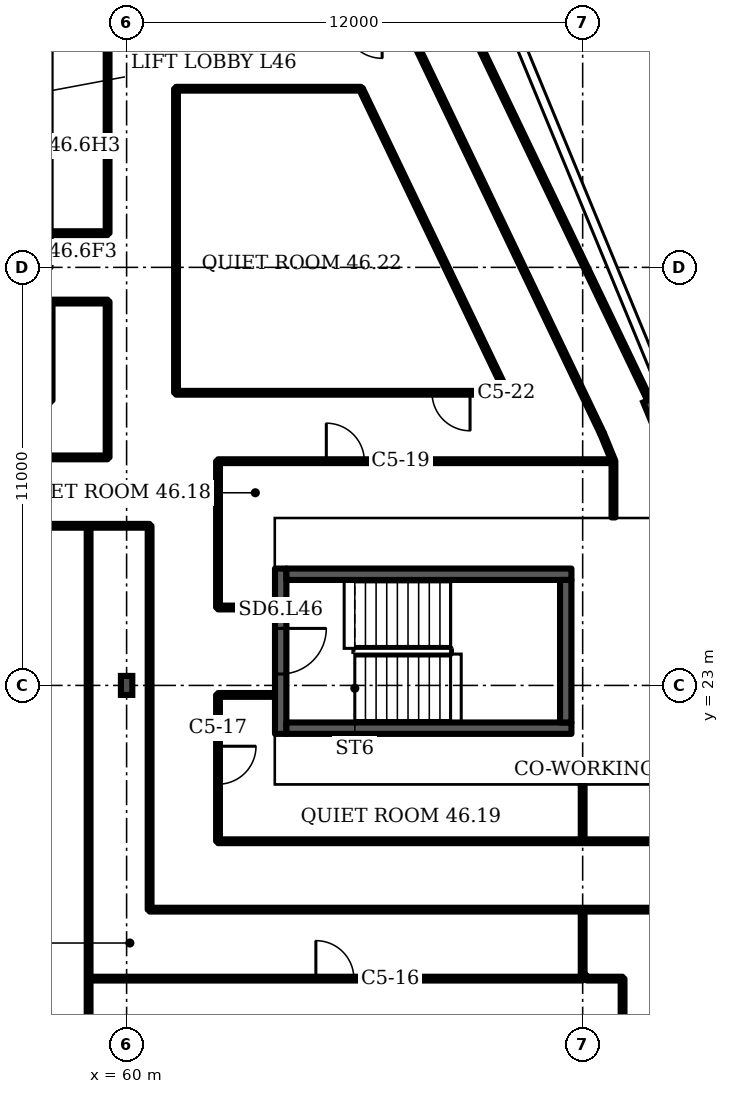
"""IFC4 building model, lengths in metres.
Left out: names, types, materials, properties, quantities, classifications, styles, units other than length and angle.
Written with IfcOpenShell. Run it as: python <this file> out.ifc"""

import sys

from ifc_helpers import new_model, si_unit, direction, frame, frame_2d, origin, origin_2d, place, context, subcontext, project, spatial, rectangle, i_section, extrude, element, fill, save


model = new_model("IFC4")
c1 = context("Model", 3, precision=1e-05, world=origin(), true_north=direction((0.0, 1.0)))
c2 = subcontext(c1, "Body", "Model", "MODEL_VIEW")
j1 = project(units=[si_unit("LENGTHUNIT", "METRE"), si_unit("PLANEANGLEUNIT", "RADIAN")], contexts=[c1])
p1 = place(None, origin())
s1 = spatial("IfcSite", under=j1, at=p1, CompositionType="ELEMENT")
p2 = place(p1, origin())
s2 = spatial("IfcBuilding", under=s1, at=p2, CompositionType="ELEMENT")
p3 = place(p2, frame((0.0, 0.0, 187.9)))
s3 = spatial("IfcBuildingStorey", under=s2, at=p3, CompositionType="ELEMENT", Elevation=187.9)
p4 = place(p3, frame((73.854, 30.219, 0.0), z_axis=(0.0, 0.0, 1.0), x_axis=(0.924325, 0.381602, 0.0)))
e1 = element("IfcColumn", 1, at=p4, inside=s3, PredefinedType="COLUMN", context=c2, shape_type="SweptSolid", body=[
    extrude(i_section(OverallWidth=0.305, OverallDepth=0.62, WebThickness=0.021, FlangeThickness=0.04, FilletRadius=0.027, at=origin_2d()), origin(), (0.0, 0.0, 1.0), 3.6),
])
p5 = place(p3, frame((60.0, 23.0, 0.0), z_axis=(0.0, 0.0, 1.0), x_axis=(1.0, 0.0, 0.0)))
e2 = element("IfcColumn", 2, at=p5, inside=s3, PredefinedType="COLUMN", context=c2, shape_type="SweptSolid", body=[
    extrude(i_section(OverallWidth=0.3, OverallDepth=0.5, WebThickness=0.014, FlangeThickness=0.028, FilletRadius=0.027, at=origin_2d()), origin(), (0.0, 0.0, 1.0), 3.6),
])
p6 = place(p3, frame((64.055, 21.725, 0.0), z_axis=(0.0, 0.0, 1.0), x_axis=(0.0, 1.0, 0.0)))
e3 = element("IfcWall", 3, at=p6, inside=s3, PredefinedType="SHEAR", context=c2, shape_type="SweptSolid", body=[
    extrude(rectangle(XDim=4.35, YDim=0.3, at=frame_2d((2.175, 0.0))), origin(), (0.0, 0.0, 1.0), 3.2),
])
p7 = place(p6, frame((1.575, 0.0, 0.0)))
e4 = element("IfcOpeningElement", 4, at=p7, cuts=e3, PredefinedType="OPENING", context=c2, shape_type="SweptSolid", body=[
    extrude(rectangle(XDim=1.2, YDim=2.1, at=frame_2d((0.6, 1.05))), frame((0.0, 0.16, 0.0), z_axis=(0.0, -1.0, 0.0), x_axis=(1.0, 0.0, 0.0)), (0.0, 0.0, 1.0), 0.32),
])
p8 = place(p3, frame((18.635, 29.0, 0.0), z_axis=(0.0, 0.0, 1.0), x_axis=(1.0, 0.0, 0.0)))
e5 = element("IfcWall", 5, at=p8, inside=s3, PredefinedType="PARTITIONING", context=c2, shape_type="SweptSolid", body=[
    extrude(rectangle(XDim=40.865, YDim=0.1, at=frame_2d((20.433, 0.0))), origin(), (0.0, 0.0, 1.0), 3.2),
])
p9 = place(p8, frame((30.545, 0.0, 0.0)))
e6 = element("IfcOpeningElement", 6, at=p9, cuts=e5, PredefinedType="OPENING", context=c2, shape_type="SweptSolid", body=[
    extrude(rectangle(XDim=1.0, YDim=2.1, at=frame_2d((0.5, 1.05))), frame((0.0, 0.06, 0.0), z_axis=(0.0, -1.0, 0.0), x_axis=(1.0, 0.0, 0.0)), (0.0, 0.0, 1.0), 0.12),
])
p10 = place(p3, frame((19.3, 27.2, 0.0), z_axis=(0.0, 0.0, 1.0), x_axis=(1.0, 0.0, 0.0)))
e7 = element("IfcWall", 7, at=p10, inside=s3, PredefinedType="PARTITIONING", context=c2, shape_type="SweptSolid", body=[
    extrude(rectangle(XDim=41.305, YDim=0.1, at=frame_2d((20.652, 0.0))), origin(), (0.0, 0.0, 1.0), 3.2),
])
p11 = place(p10, frame((32.32, 0.0, 0.0)))
e8 = element("IfcOpeningElement", 8, at=p11, cuts=e7, PredefinedType="OPENING", context=c2, shape_type="SweptSolid", body=[
    extrude(rectangle(XDim=1.8, YDim=2.1, at=frame_2d((0.9, 1.05))), frame((0.0, 0.06, 0.0), z_axis=(0.0, -1.0, 0.0), x_axis=(1.0, 0.0, 0.0)), (0.0, 0.0, 1.0), 0.12),
])
p12 = place(p3, frame((58.0, 33.1, 0.0), z_axis=(0.0, 0.0, 1.0), x_axis=(1.0, 0.0, 0.0)))
e9 = element("IfcWall", 9, at=p12, inside=s3, PredefinedType="PARTITIONING", context=c2, shape_type="SweptSolid", body=[
    extrude(rectangle(XDim=1.5, YDim=0.1, at=frame_2d((0.75, 0.0))), origin(), (0.0, 0.0, 1.0), 3.2),
])
p13 = place(p3, frame((58.02, 34.9, 0.0), z_axis=(0.0, 0.0, 1.0), x_axis=(1.0, 0.0, 0.0)))
e10 = element("IfcWall", 10, at=p13, inside=s3, PredefinedType="PARTITIONING", context=c2, shape_type="SweptSolid", body=[
    extrude(rectangle(XDim=1.48, YDim=0.1, at=frame_2d((0.74, 0.0))), origin(), (0.0, 0.0, 1.0), 3.2),
])
p14 = place(p3, frame((59.0, 13.625, 0.0), z_axis=(0.0, 0.0, 1.0), x_axis=(0.0, 1.0, 0.0)))
e11 = element("IfcWall", 11, at=p14, inside=s3, PredefinedType="PARTITIONING", context=c2, shape_type="SweptSolid", body=[
    extrude(rectangle(XDim=13.575, YDim=0.1, at=frame_2d((6.788, 0.0))), origin(), (0.0, 0.0, 1.0), 3.2),
])
p15 = place(p3, frame((59.0, 15.285, 0.0), z_axis=(0.0, 0.0, 1.0), x_axis=(1.0, 0.0, 0.0)))
e12 = element("IfcWall", 12, at=p15, inside=s3, PredefinedType="PARTITIONING", context=c2, shape_type="SweptSolid", body=[
    extrude(rectangle(XDim=13.0, YDim=0.1, at=frame_2d((6.5, 0.0))), origin(), (0.0, 0.0, 1.0), 3.2),
])
p16 = place(p15, frame((5.98, 0.0, 0.0)))
e13 = element("IfcOpeningElement", 13, at=p16, cuts=e12, PredefinedType="OPENING", context=c2, shape_type="SweptSolid", body=[
    extrude(rectangle(XDim=1.0, YDim=2.1, at=frame_2d((0.5, 1.05))), frame((0.0, 0.06, 0.0), z_axis=(0.0, -1.0, 0.0), x_axis=(1.0, 0.0, 0.0)), (0.0, 0.0, 1.0), 0.12),
])
p17 = place(p3, frame((59.5, 29.0, 0.0), z_axis=(0.0, 0.0, 1.0), x_axis=(0.0, 1.0, 0.0)))
e14 = element("IfcWall", 14, at=p17, inside=s3, PredefinedType="PARTITIONING", context=c2, shape_type="SweptSolid", body=[
    extrude(rectangle(XDim=4.1, YDim=0.1, at=frame_2d((2.05, 0.0))), origin(), (0.0, 0.0, 1.0), 3.2),
])
p18 = place(p3, frame((59.5, 34.9, 0.0), z_axis=(0.0, 0.0, 1.0), x_axis=(0.0, 1.0, 0.0)))
e15 = element("IfcWall", 15, at=p18, inside=s3, PredefinedType="PARTITIONING", context=c2, shape_type="SweptSolid", body=[
    extrude(rectangle(XDim=5.6, YDim=0.1, at=frame_2d((2.8, 0.0))), origin(), (0.0, 0.0, 1.0), 3.2),
])
p19 = place(p3, frame((60.605, 17.1, 0.0), z_axis=(0.0, 0.0, 1.0), x_axis=(0.0, 1.0, 0.0)))
e16 = element("IfcWall", 16, at=p19, inside=s3, PredefinedType="PARTITIONING", context=c2, shape_type="SweptSolid", body=[
    extrude(rectangle(XDim=10.1, YDim=0.1, at=frame_2d((5.05, 0.0))), origin(), (0.0, 0.0, 1.0), 3.2),
])
p20 = place(p3, frame((60.605, 17.1, 0.0), z_axis=(0.0, 0.0, 1.0), x_axis=(1.0, 0.0, 0.0)))
e17 = element("IfcWall", 17, at=p20, inside=s3, PredefinedType="PARTITIONING", context=c2, shape_type="SweptSolid", body=[
    extrude(rectangle(XDim=15.58, YDim=0.1, at=frame_2d((7.79, 0.0))), origin(), (0.0, 0.0, 1.0), 3.2),
])
p21 = place(p3, frame((61.3, 30.7, 0.0), z_axis=(0.0, 0.0, 1.0), x_axis=(0.0, 1.0, 0.0)))
e18 = element("IfcWall", 18, at=p21, inside=s3, PredefinedType="PARTITIONING", context=c2, shape_type="SweptSolid", body=[
    extrude(rectangle(XDim=8.0, YDim=0.1, at=frame_2d((4.0, 0.0))), origin(), (0.0, 0.0, 1.0), 3.2),
])
p22 = place(p3, frame((61.3, 30.7, 0.0), z_axis=(0.0, 0.0, 1.0), x_axis=(1.0, 0.0, 0.0)))
e19 = element("IfcWall", 19, at=p22, inside=s3, PredefinedType="PARTITIONING", context=c2, shape_type="SweptSolid", body=[
    extrude(rectangle(XDim=8.7, YDim=0.1, at=frame_2d((4.35, 0.0))), origin(), (0.0, 0.0, 1.0), 3.2),
])
p23 = place(p22, frame((6.737, 0.0, 0.0)))
e20 = element("IfcOpeningElement", 20, at=p23, cuts=e19, PredefinedType="OPENING", context=c2, shape_type="SweptSolid", body=[
    extrude(rectangle(XDim=1.0, YDim=2.1, at=frame_2d((0.5, 1.05))), frame((0.0, 0.06, 0.0), z_axis=(0.0, -1.0, 0.0), x_axis=(1.0, 0.0, 0.0)), (0.0, 0.0, 1.0), 0.12),
])
p24 = place(p3, frame((61.3, 38.7, 0.0), z_axis=(0.0, 0.0, 1.0), x_axis=(1.0, 0.0, 0.0)))
e21 = element("IfcWall", 21, at=p24, inside=s3, PredefinedType="PARTITIONING", context=c2, shape_type="SweptSolid", body=[
    extrude(rectangle(XDim=4.865, YDim=0.1, at=frame_2d((2.433, 0.0))), origin(), (0.0, 0.0, 1.0), 3.2),
])
p25 = place(p3, frame((62.405, 18.9, 0.0), z_axis=(0.0, 0.0, 1.0), x_axis=(0.0, 1.0, 0.0)))
e22 = element("IfcWall", 22, at=p25, inside=s3, PredefinedType="PARTITIONING", context=c2, shape_type="SweptSolid", body=[
    extrude(rectangle(XDim=3.85, YDim=0.1, at=frame_2d((1.925, 0.0))), origin(), (0.0, 0.0, 1.0), 3.2),
])
p26 = place(p25, frame((1.5, 0.0, 0.0)))
e23 = element("IfcOpeningElement", 23, at=p26, cuts=e22, PredefinedType="OPENING", context=c2, shape_type="SweptSolid", body=[
    extrude(rectangle(XDim=1.0, YDim=2.1, at=frame_2d((0.5, 1.05))), frame((0.0, 0.06, 0.0), z_axis=(0.0, -1.0, 0.0), x_axis=(1.0, 0.0, 0.0)), (0.0, 0.0, 1.0), 0.12),
])
p27 = place(p3, frame((62.405, 18.9, 0.0), z_axis=(0.0, 0.0, 1.0), x_axis=(1.0, 0.0, 0.0)))
e24 = element("IfcWall", 24, at=p27, inside=s3, PredefinedType="PARTITIONING", context=c2, shape_type="SweptSolid", body=[
    extrude(rectangle(XDim=14.985, YDim=0.1, at=frame_2d((7.492, 0.0))), origin(), (0.0, 0.0, 1.0), 3.2),
])
p28 = place(p3, frame((62.405, 22.75, 0.0), z_axis=(0.0, 0.0, 1.0), x_axis=(1.0, 0.0, 0.0)))
e25 = element("IfcWall", 25, at=p28, inside=s3, PredefinedType="PARTITIONING", context=c2, shape_type="SweptSolid", body=[
    extrude(rectangle(XDim=1.479, YDim=0.1, at=frame_2d((0.74, 0.0))), origin(), (0.0, 0.0, 1.0), 3.2),
])
p29 = place(p3, frame((62.405, 25.05, 0.0), z_axis=(0.0, 0.0, 1.0), x_axis=(0.0, 1.0, 0.0)))
e26 = element("IfcWall", 26, at=p29, inside=s3, PredefinedType="PARTITIONING", context=c2, shape_type="SweptSolid", body=[
    extrude(rectangle(XDim=3.85, YDim=0.1, at=frame_2d((1.925, 0.0))), origin(), (0.0, 0.0, 1.0), 3.2),
])
p30 = place(p3, frame((62.405, 25.05, 0.0), z_axis=(0.0, 0.0, 1.0), x_axis=(1.0, 0.0, 0.0)))
e27 = element("IfcWall", 27, at=p30, inside=s3, PredefinedType="PARTITIONING", context=c2, shape_type="SweptSolid", body=[
    extrude(rectangle(XDim=1.479, YDim=0.1, at=frame_2d((0.74, 0.0))), origin(), (0.0, 0.0, 1.0), 3.2),
])
p31 = place(p3, frame((62.405, 28.9, 0.0), z_axis=(0.0, 0.0, 1.0), x_axis=(1.0, 0.0, 0.0)))
e28 = element("IfcWall", 28, at=p31, inside=s3, PredefinedType="PARTITIONING", context=c2, shape_type="SweptSolid", body=[
    extrude(rectangle(XDim=10.405, YDim=0.1, at=frame_2d((5.203, 0.0))), origin(), (0.0, 0.0, 1.0), 3.2),
])
p32 = place(p31, frame((2.85, 0.0, 0.0)))
e29 = element("IfcOpeningElement", 29, at=p32, cuts=e28, PredefinedType="OPENING", context=c2, shape_type="SweptSolid", body=[
    extrude(rectangle(XDim=1.0, YDim=2.1, at=frame_2d((0.5, 1.05))), frame((0.0, 0.06, 0.0), z_axis=(0.0, -1.0, 0.0), x_axis=(1.0, 0.0, 0.0)), (0.0, 0.0, 1.0), 0.12),
])
p33 = place(p3, frame((70.0, 30.7, 0.0), z_axis=(0.0, 0.0, 1.0), x_axis=(-0.432271, 0.901748, 0.0)))
e30 = element("IfcWall", 30, at=p33, inside=s3, PredefinedType="PARTITIONING", context=c2, shape_type="SweptSolid", body=[
    extrude(rectangle(XDim=8.872, YDim=0.1, at=frame_2d((4.436, 0.0))), origin(), (0.0, 0.0, 1.0), 3.2),
])
p34 = place(p3, frame((72.0, 15.285, 0.0), z_axis=(0.0, 0.0, 1.0), x_axis=(0.0, 1.0, 0.0)))
e31 = element("IfcWall", 31, at=p34, inside=s3, PredefinedType="PARTITIONING", context=c2, shape_type="SweptSolid", body=[
    extrude(rectangle(XDim=1.815, YDim=0.1, at=frame_2d((0.908, 0.0))), origin(), (0.0, 0.0, 1.0), 3.2),
])
p35 = place(p3, frame((72.0, 18.9, 0.0), z_axis=(0.0, 0.0, 1.0), x_axis=(0.0, 1.0, 0.0)))
e32 = element("IfcWall", 32, at=p35, inside=s3, PredefinedType="PARTITIONING", context=c2, shape_type="SweptSolid", body=[
    extrude(rectangle(XDim=1.48, YDim=0.1, at=frame_2d((0.74, 0.0))), origin(), (0.0, 0.0, 1.0), 3.2),
])
p36 = place(p3, frame((72.11, 15.285, 0.0), z_axis=(0.0, 0.0, 1.0), x_axis=(1.0, 0.0, 0.0)))
e33 = element("IfcWall", 33, at=p36, inside=s3, PredefinedType="PARTITIONING", context=c2, shape_type="SweptSolid", body=[
    extrude(rectangle(XDim=0.94, YDim=0.1, at=frame_2d((0.47, 0.0))), origin(), (0.0, 0.0, 1.0), 3.2),
])
p37 = place(p3, frame((72.11, 15.285, 0.0), z_axis=(0.0, 0.0, 1.0), x_axis=(-0.675728, 0.737158, 0.0)))
e34 = element("IfcWall", 34, at=p37, inside=s3, PredefinedType="PARTITIONING", context=c2, shape_type="SweptSolid", body=[
    extrude(rectangle(XDim=0.163, YDim=0.1, at=frame_2d((0.082, 0.0))), origin(), (0.0, 0.0, 1.0), 3.2),
])
p38 = place(p3, frame((72.515, 29.62, 0.0), z_axis=(0.0, 0.0, 1.0), x_axis=(-0.43171, 0.902012, 0.0)))
e35 = element("IfcWall", 35, at=p38, inside=s3, PredefinedType="PARTITIONING", context=c2, shape_type="SweptSolid", body=[
    extrude(rectangle(XDim=12.007, YDim=0.1, at=frame_2d((6.003, 0.0))), origin(), (0.0, 0.0, 1.0), 3.2),
])
p39 = place(p3, frame((72.81, 28.9, 0.0), z_axis=(0.0, 0.0, 1.0), x_axis=(-0.379219, 0.925307, 0.0)))
e36 = element("IfcWall", 36, at=p39, inside=s3, PredefinedType="PARTITIONING", context=c2, shape_type="SweptSolid", body=[
    extrude(rectangle(XDim=0.778, YDim=0.1, at=frame_2d((0.389, 0.0))), origin(), (0.0, 0.0, 1.0), 3.2),
])
p40 = place(p3, frame((72.81, 27.42, 0.0), z_axis=(0.0, 0.0, 1.0), x_axis=(0.0, 1.0, 0.0)))
e37 = element("IfcWall", 37, at=p40, inside=s3, PredefinedType="PARTITIONING", context=c2, shape_type="SweptSolid", body=[
    extrude(rectangle(XDim=1.48, YDim=0.1, at=frame_2d((0.74, 0.0))), origin(), (0.0, 0.0, 1.0), 3.2),
])
p41 = place(p3, frame((73.05, 6.665, 0.0), z_axis=(0.0, 0.0, 1.0), x_axis=(0.0, 1.0, 0.0)))
e38 = element("IfcWall", 38, at=p41, inside=s3, PredefinedType="PARTITIONING", context=c2, shape_type="SweptSolid", body=[
    extrude(rectangle(XDim=8.62, YDim=0.1, at=frame_2d((4.31, 0.0))), origin(), (0.0, 0.0, 1.0), 3.2),
])
p42 = place(p3, frame((73.885, 30.23, 0.0), z_axis=(0.0, 0.0, 1.0), x_axis=(-0.432032, 0.901863, 0.0)))
e39 = element("IfcWall", 39, at=p42, inside=s3, PredefinedType="PARTITIONING", context=c2, shape_type="SweptSolid", body=[
    extrude(rectangle(XDim=13.015, YDim=0.1, at=frame_2d((6.507, 0.0))), origin(), (0.0, 0.0, 1.0), 2.58),
])
for number, where, z_axis, x_axis in (
    (40, (64.205, 21.875, 0.0), (0.0, 0.0, 1.0), (1.0, 0.0, 0.0)),
    (41, (64.205, 25.925, 0.0), (0.0, 0.0, 1.0), (1.0, 0.0, 0.0)),
):
    element("IfcWall", number, at=place(p3, frame(where, z_axis=z_axis, x_axis=x_axis)), inside=s3, PredefinedType="SHEAR", context=c2, shape_type="SweptSolid", body=[
        extrude(rectangle(XDim=7.5, YDim=0.3, at=frame_2d((3.75, 0.0))), origin(), (0.0, 0.0, 1.0), 3.2),
    ])
p43 = place(p3, frame((71.555, 22.025, 0.0), z_axis=(0.0, 0.0, 1.0), x_axis=(0.0, 1.0, 0.0)))
e42 = element("IfcWall", 42, at=p43, inside=s3, PredefinedType="SHEAR", context=c2, shape_type="SweptSolid", body=[
    extrude(rectangle(XDim=3.75, YDim=0.3, at=frame_2d((1.875, 0.0))), origin(), (0.0, 0.0, 1.0), 3.2),
])
p44 = place(p7, origin())
e43 = element("IfcDoor", 43, at=p44, inside=s3, OperationType="SINGLE_SWING_RIGHT", PredefinedType="DOOR", context=c2, shape_type="SweptSolid", body=[
    extrude(rectangle(XDim=1.2, YDim=2.1, at=frame_2d((0.6, 1.05))), frame((0.0, 0.025, 0.0), z_axis=(0.0, -1.0, 0.0), x_axis=(1.0, 0.0, 0.0)), (0.0, 0.0, 1.0), 0.05),
])
fill(e4, e43)
p45 = place(p16, origin())
e44 = element("IfcDoor", 44, at=p45, inside=s3, OperationType="SINGLE_SWING_LEFT", PredefinedType="DOOR", context=c2, shape_type="SweptSolid", body=[
    extrude(rectangle(XDim=1.0, YDim=2.1, at=frame_2d((0.5, 1.05))), frame((0.0, 0.025, 0.0), z_axis=(0.0, -1.0, 0.0), x_axis=(1.0, 0.0, 0.0)), (0.0, 0.0, 1.0), 0.05),
])
fill(e13, e44)
p46 = place(p26, origin())
e45 = element("IfcDoor", 45, at=p46, inside=s3, OperationType="SINGLE_SWING_RIGHT", PredefinedType="DOOR", context=c2, shape_type="SweptSolid", body=[
    extrude(rectangle(XDim=1.0, YDim=2.1, at=frame_2d((0.5, 1.05))), frame((0.0, 0.025, 0.0), z_axis=(0.0, -1.0, 0.0), x_axis=(1.0, 0.0, 0.0)), (0.0, 0.0, 1.0), 0.05),
])
fill(e23, e45)
p47 = place(p32, origin())
e46 = element("IfcDoor", 46, at=p47, inside=s3, OperationType="SINGLE_SWING_LEFT", PredefinedType="DOOR", context=c2, shape_type="SweptSolid", body=[
    extrude(rectangle(XDim=1.0, YDim=2.1, at=frame_2d((0.5, 1.05))), frame((0.0, 0.025, 0.0), z_axis=(0.0, -1.0, 0.0), x_axis=(1.0, 0.0, 0.0)), (0.0, 0.0, 1.0), 0.05),
])
fill(e29, e46)
p48 = place(p23, origin())
e47 = element("IfcDoor", 47, at=p48, inside=s3, OperationType="SINGLE_SWING_RIGHT", PredefinedType="DOOR", context=c2, shape_type="SweptSolid", body=[
    extrude(rectangle(XDim=1.0, YDim=2.1, at=frame_2d((0.5, 1.05))), frame((0.0, 0.025, 0.0), z_axis=(0.0, -1.0, 0.0), x_axis=(1.0, 0.0, 0.0)), (0.0, 0.0, 1.0), 0.05),
])
fill(e20, e47)
save(model, sys.argv[1])
